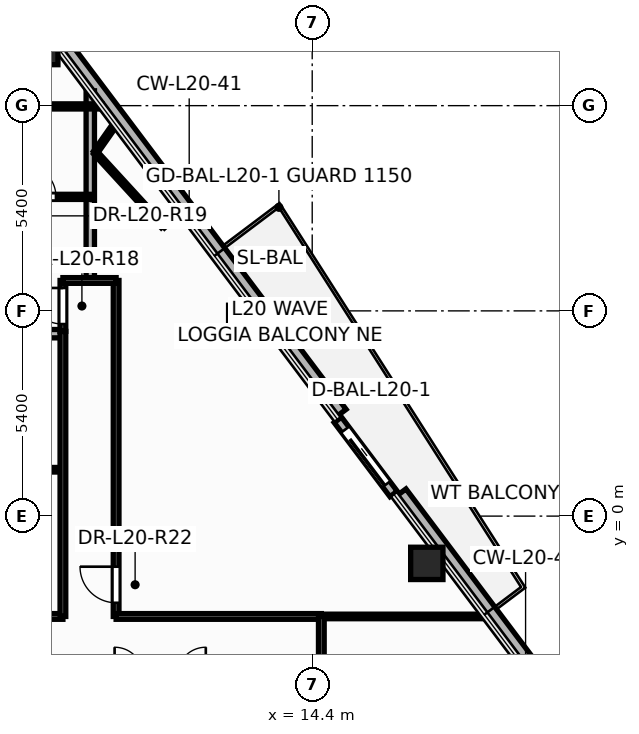
"""IFC4 building model, lengths in metres.
Left out: names, types, materials, properties, quantities, classifications, styles, units other than length and angle.
Written with IfcOpenShell. Run it as: python <this file> out.ifc"""

import sys

from ifc_helpers import new_model, si_unit, direction, frame, frame_2d, origin, origin_2d, place, context, subcontext, project, spatial, rectangle, hollow_rectangle, hollow_circle, extrude, element, fill, save


model = new_model("IFC4")
c1 = context("Model", 3, precision=1e-05, world=origin(), true_north=direction((0.0, 1.0)))
c2 = subcontext(c1, "Body", "Model", "MODEL_VIEW")
j1 = project(units=[si_unit("LENGTHUNIT", "METRE"), si_unit("PLANEANGLEUNIT", "RADIAN")], contexts=[c1])
p1 = place(None, origin())
s1 = spatial("IfcSite", under=j1, at=p1, CompositionType="ELEMENT")
p2 = place(p1, origin())
s2 = spatial("IfcBuilding", under=s1, at=p2, CompositionType="ELEMENT")
p3 = place(p2, frame((0.0, 0.0, 79.2)))
s3 = spatial("IfcBuildingStorey", under=s2, at=p3, CompositionType="ELEMENT", Elevation=79.2)
p4 = place(p3, frame((7.034, 12.553, 0.0), z_axis=(0.0, 0.0, 1.0), x_axis=(1.0, 0.0, 0.0)))
e1 = element("IfcColumn", 1, at=p4, inside=s3, PredefinedType="COLUMN", context=c2, shape_type="SweptSolid", body=[
    extrude(hollow_rectangle(XDim=1.35, YDim=1.35, WallThickness=0.065, at=origin_2d()), origin(), (0.0, 0.0, 1.0), 3.6),
])
for number, where, z_axis, x_axis in (
    (2, (17.416, -1.244, 0.0), (0.0, 0.0, 1.0), (1.0, 0.0, 0.0)),
    (3, (12.624, 5.124, 0.0), (0.0, 0.0, 1.0), (1.0, 0.0, 0.0)),
):
    element("IfcColumn", number, at=place(p3, frame(where, z_axis=z_axis, x_axis=x_axis)), inside=s3, PredefinedType="COLUMN", context=c2, shape_type="SweptSolid", body=[
        extrude(hollow_circle(Radius=0.425, WallThickness=0.038, at=origin_2d()), origin(), (0.0, 0.0, 1.0), 3.6),
    ])
p5 = place(p3, frame((23.562, -8.481, -0.2), z_axis=(0.0, 0.0, 1.0), x_axis=(-0.601239151346, 0.799069135237, 0.0)))
e4 = element("IfcWall", 4, at=p5, inside=s3, PredefinedType="PARAPET", context=c2, shape_type="SweptSolid", body=[
    extrude(rectangle(XDim=11.373, YDim=0.36, at=frame_2d((5.687, 0.0))), origin(), (0.0, 0.0, 1.0), 0.38),
])
p6 = place(p3, frame((15.148, 2.701, -0.2), z_axis=(0.0, 0.0, 1.0), x_axis=(-0.601235358398, 0.79907198913, 0.0)))
e5 = element("IfcWall", 5, at=p6, inside=s3, PredefinedType="PARAPET", context=c2, shape_type="SweptSolid", body=[
    extrude(rectangle(XDim=12.83, YDim=0.36, at=frame_2d((6.415, 0.0))), origin(), (0.0, 0.0, 1.0), 0.38),
])
p7 = place(p3, frame((16.542, 0.583, -0.015), z_axis=(0.0, 0.0, 1.0), x_axis=(-0.601247991813, 0.799062483377, 0.0)))
e6 = element("IfcWall", 6, at=p7, inside=s3, PredefinedType="STANDARD", context=c2, shape_type="SweptSolid", body=[
    extrude(rectangle(XDim=2.44, YDim=0.24, at=frame_2d((1.22, 0.0))), origin(), (0.0, 0.0, 1.0), 2.728),
])
p8 = place(p7, frame((0.32, 0.0, 0.015)))
e7 = element("IfcOpeningElement", 7, at=p8, cuts=e6, PredefinedType="OPENING", context=c2, shape_type="SweptSolid", body=[
    extrude(rectangle(XDim=1.806, YDim=2.204, at=frame_2d((0.9, 1.102))), frame((0.0, 0.13, 0.0), z_axis=(0.0, -1.0, 0.0), x_axis=(1.0, 0.0, 0.0)), (0.0, 0.0, 1.0), 0.26),
])
p9 = place(p3, frame((-5.32, -2.64, 0.0), z_axis=(0.0, 0.0, 1.0), x_axis=(1.0, 0.0, 0.0)))
e8 = element("IfcWall", 8, at=p9, inside=s3, PredefinedType="PARTITIONING", context=c2, shape_type="SweptSolid", body=[
    extrude(rectangle(XDim=13.16, YDim=0.15, at=frame_2d((6.58, 0.0))), origin(), (0.0, 0.0, 1.0), 2.325),
])
p10 = place(p9, frame((0.439, 0.0, 0.0)))
e9 = element("IfcOpeningElement", 9, at=p10, cuts=e8, PredefinedType="OPENING", context=c2, shape_type="SweptSolid", body=[
    extrude(rectangle(XDim=0.956, YDim=2.104, at=frame_2d((0.475, 1.052))), frame((0.0, 0.085, 0.0), z_axis=(0.0, -1.0, 0.0), x_axis=(1.0, 0.0, 0.0)), (0.0, 0.0, 1.0), 0.17),
])
p11 = place(p3, frame((9.24, -2.64, 0.0), z_axis=(0.0, 0.0, 1.0), x_axis=(0.0, 1.0, 0.0)))
e10 = element("IfcWall", 10, at=p11, inside=s3, PredefinedType="PARTITIONING", context=c2, shape_type="SweptSolid", body=[
    extrude(rectangle(XDim=8.84, YDim=0.15, at=frame_2d((4.42, 0.0))), origin(), (0.0, 0.0, 1.0), 2.325),
])
p12 = place(p11, frame((0.359, 0.0, 0.0)))
e11 = element("IfcOpeningElement", 11, at=p12, cuts=e10, PredefinedType="OPENING", context=c2, shape_type="SweptSolid", body=[
    extrude(rectangle(XDim=0.956, YDim=2.104, at=frame_2d((0.475, 1.052))), frame((0.0, 0.085, 0.0), z_axis=(0.0, -1.0, 0.0), x_axis=(1.0, 0.0, 0.0)), (0.0, 0.0, 1.0), 0.17),
])
p13 = place(p3, frame((0.84, 1.22, 0.0), z_axis=(0.0, 0.0, 1.0), x_axis=(1.0, 0.0, 0.0)))
e12 = element("IfcWall", 12, at=p13, inside=s3, PredefinedType="PARTITIONING", context=c2, shape_type="SweptSolid", body=[
    extrude(rectangle(XDim=7.0, YDim=0.12, at=frame_2d((3.5, 0.0))), origin(), (0.0, 0.0, 1.0), 2.325),
])
p14 = place(p13, frame((0.875, 0.0, 0.0)))
e13 = element("IfcOpeningElement", 13, at=p14, cuts=e12, PredefinedType="OPENING", context=c2, shape_type="SweptSolid", body=[
    extrude(rectangle(XDim=0.926, YDim=2.104, at=frame_2d((0.46, 1.052))), frame((0.0, 0.07, 0.0), z_axis=(0.0, -1.0, 0.0), x_axis=(1.0, 0.0, 0.0)), (0.0, 0.0, 1.0), 0.14),
])
p15 = place(p3, frame((0.9, 4.8, 0.0), z_axis=(0.0, 0.0, 1.0), x_axis=(1.0, 0.0, 0.0)))
e14 = element("IfcWall", 14, at=p15, inside=s3, PredefinedType="PARTITIONING", context=c2, shape_type="SweptSolid", body=[
    extrude(rectangle(XDim=6.94, YDim=0.22, at=frame_2d((3.47, 0.0))), origin(), (0.0, 0.0, 1.0), 2.325),
])
p16 = place(p3, frame((9.24, -2.64, 0.0), z_axis=(0.0, 0.0, 1.0), x_axis=(1.0, 0.0, 0.0)))
e15 = element("IfcWall", 15, at=p16, inside=s3, PredefinedType="PARTITIONING", context=c2, shape_type="SweptSolid", body=[
    extrude(rectangle(XDim=5.4, YDim=0.15, at=frame_2d((2.7, 0.0))), origin(), (0.0, 0.0, 1.0), 3.35),
])
p17 = place(p3, frame((14.64, -2.64, 0.0), z_axis=(0.0, 0.0, 1.0), x_axis=(1.0, 0.0, 0.0)))
e16 = element("IfcWall", 16, at=p17, inside=s3, PredefinedType="PARTITIONING", context=c2, shape_type="SweptSolid", body=[
    extrude(rectangle(XDim=4.327, YDim=0.12, at=frame_2d((2.163, 0.0))), origin(), (0.0, 0.0, 1.0), 2.713),
])
p18 = place(p3, frame((7.84, -2.64, 0.0), z_axis=(0.0, 0.0, 1.0), x_axis=(0.0, 1.0, 0.0)))
e17 = element("IfcWall", 17, at=p18, inside=s3, PredefinedType="PARTITIONING", context=c2, shape_type="SweptSolid", body=[
    extrude(rectangle(XDim=7.5, YDim=0.15, at=frame_2d((3.75, 0.0))), origin(), (0.0, 0.0, 1.0), 2.325),
])
p19 = place(p3, frame((8.56, 6.2, 0.0), z_axis=(0.0, 0.0, 1.0), x_axis=(0.0, 1.0, 0.0)))
e18 = element("IfcWall", 18, at=p19, inside=s3, PredefinedType="PARTITIONING", context=c2, shape_type="SweptSolid", body=[
    extrude(rectangle(XDim=4.991, YDim=0.22, at=frame_2d((2.495, 0.0))), origin(), (0.0, 0.0, 1.0), 2.325),
])
p20 = place(p3, frame((6.2, 10.78, 0.0), z_axis=(0.0, 0.0, 1.0), x_axis=(1.0, 0.0, 0.0)))
e19 = element("IfcWall", 19, at=p20, inside=s3, PredefinedType="PARTITIONING", context=c2, shape_type="SweptSolid", body=[
    extrude(rectangle(XDim=2.669, YDim=0.135, at=frame_2d((1.334, 0.0))), origin(), (0.0, 0.0, 1.0), 2.713),
])
p21 = place(p3, frame((10.472, 7.627, 0.0), z_axis=(0.0, 0.0, 1.0), x_axis=(-0.675779241876, 0.737104074232, 0.0)))
e20 = element("IfcWall", 20, at=p21, inside=s3, PredefinedType="PARTITIONING", context=c2, shape_type="SweptSolid", body=[
    extrude(rectangle(XDim=2.632, YDim=0.12, at=frame_2d((1.316, 0.0))), origin(), (0.0, 0.0, 1.0), 3.35),
])
p22 = place(p3, frame((6.262, 8.4, 0.0), z_axis=(0.0, 0.0, 1.0), x_axis=(1.0, 0.0, 0.0)))
e21 = element("IfcWall", 21, at=p22, inside=s3, PredefinedType="PARTITIONING", context=c2, shape_type="SweptSolid", body=[
    extrude(rectangle(XDim=2.298, YDim=0.135, at=frame_2d((1.149, 0.0))), origin(), (0.0, 0.0, 1.0), 3.35),
])
p23 = place(p22, frame((0.546, 0.0, 0.0)))
e22 = element("IfcOpeningElement", 22, at=p23, cuts=e21, PredefinedType="OPENING", context=c2, shape_type="SweptSolid", body=[
    extrude(rectangle(XDim=0.856, YDim=2.104, at=frame_2d((0.425, 1.052))), frame((0.0, 0.078, 0.0), z_axis=(0.0, -1.0, 0.0), x_axis=(1.0, 0.0, 0.0)), (0.0, 0.0, 1.0), 0.155),
])
p24 = place(p3, frame((14.64, -4.4, 0.0), z_axis=(0.0, 0.0, 1.0), x_axis=(0.0, 1.0, 0.0)))
e23 = element("IfcWall", 23, at=p24, inside=s3, PredefinedType="PARTITIONING", context=c2, shape_type="SweptSolid", body=[
    extrude(rectangle(XDim=1.76, YDim=0.15, at=frame_2d((0.88, 0.0))), origin(), (0.0, 0.0, 1.0), 3.35),
])
p25 = place(p3, frame((7.84, 4.862, 0.0), z_axis=(0.0, 0.0, 1.0), x_axis=(0.0, 1.0, 0.0)))
e24 = element("IfcWall", 24, at=p25, inside=s3, PredefinedType="PARTITIONING", context=c2, shape_type="SweptSolid", body=[
    extrude(rectangle(XDim=1.338, YDim=0.15, at=frame_2d((0.669, 0.0))), origin(), (0.0, 0.0, 1.0), 3.35),
])
p26 = place(p25, frame((0.191, 0.0, 0.0)))
e25 = element("IfcOpeningElement", 25, at=p26, cuts=e24, PredefinedType="OPENING", context=c2, shape_type="SweptSolid", body=[
    extrude(rectangle(XDim=0.956, YDim=2.104, at=frame_2d((0.475, 1.052))), frame((0.0, 0.085, 0.0), z_axis=(0.0, -1.0, 0.0), x_axis=(1.0, 0.0, 0.0)), (0.0, 0.0, 1.0), 0.17),
])
p27 = place(p3, frame((8.694, 9.566, 0.0), z_axis=(0.0, 0.0, 1.0), x_axis=(0.574241580185, 0.818685902888, 0.0)))
e26 = element("IfcWall", 26, at=p27, inside=s3, PredefinedType="PARTITIONING", context=c2, shape_type="SweptSolid", body=[
    extrude(rectangle(XDim=0.904, YDim=0.12, at=frame_2d((0.452, 0.0))), origin(), (0.0, 0.0, 1.0), 2.713),
])
p28 = place(p3, frame((7.84, 6.2, 0.0), z_axis=(0.0, 0.0, 1.0), x_axis=(1.0, 0.0, 0.0)))
e27 = element("IfcWall", 27, at=p28, inside=s3, PredefinedType="PARTITIONING", context=c2, shape_type="SweptSolid", body=[
    extrude(rectangle(XDim=1.4, YDim=0.15, at=frame_2d((0.7, 0.0))), origin(), (0.0, 0.0, 1.0), 3.35),
])
p29 = place(p3, frame((10.92, 8.038, 0.0), z_axis=(0.0, 0.0, 1.0), x_axis=(-0.737154140201, -0.675724628517, 0.0)))
e28 = element("IfcWall", 28, at=p29, inside=s3, PredefinedType="PARTITIONING", context=c2, shape_type="SweptSolid", body=[
    extrude(rectangle(XDim=0.608, YDim=0.12, at=frame_2d((0.304, 0.0))), origin(), (0.0, 0.0, 1.0), 2.713),
])
p30 = place(p8, origin())
e29 = element("IfcDoor", 29, at=p30, inside=s3, OperationType="SLIDING_TO_LEFT", PredefinedType="DOOR", context=c2, shape_type="SweptSolid", body=[
    extrude(rectangle(XDim=1.8, YDim=2.2, at=frame_2d((0.9, 1.1))), frame((0.0, 0.025, 0.0), z_axis=(0.0, -1.0, 0.0), x_axis=(1.0, 0.0, 0.0)), (0.0, 0.0, 1.0), 0.05),
])
fill(e7, e29)
p31 = place(p26, origin())
e30 = element("IfcDoor", 30, at=p31, inside=s3, OperationType="SINGLE_SWING_RIGHT", PredefinedType="DOOR", context=c2, shape_type="SweptSolid", body=[
    extrude(rectangle(XDim=0.95, YDim=2.1, at=frame_2d((0.475, 1.05))), frame((0.0, 0.025, 0.0), z_axis=(0.0, -1.0, 0.0), x_axis=(1.0, 0.0, 0.0)), (0.0, 0.0, 1.0), 0.05),
])
fill(e25, e30)
p32 = place(p23, origin())
e31 = element("IfcDoor", 31, at=p32, inside=s3, OperationType="SINGLE_SWING_LEFT", PredefinedType="DOOR", context=c2, shape_type="SweptSolid", body=[
    extrude(rectangle(XDim=0.85, YDim=2.1, at=frame_2d((0.425, 1.05))), frame((0.0, 0.025, 0.0), z_axis=(0.0, -1.0, 0.0), x_axis=(1.0, 0.0, 0.0)), (0.0, 0.0, 1.0), 0.05),
])
fill(e22, e31)
p33 = place(p12, origin())
e32 = element("IfcDoor", 32, at=p33, inside=s3, OperationType="SINGLE_SWING_RIGHT", PredefinedType="DOOR", context=c2, shape_type="SweptSolid", body=[
    extrude(rectangle(XDim=0.95, YDim=2.1, at=frame_2d((0.475, 1.05))), frame((0.0, 0.025, 0.0), z_axis=(0.0, -1.0, 0.0), x_axis=(1.0, 0.0, 0.0)), (0.0, 0.0, 1.0), 0.05),
])
fill(e11, e32)
save(model, sys.argv[1])
